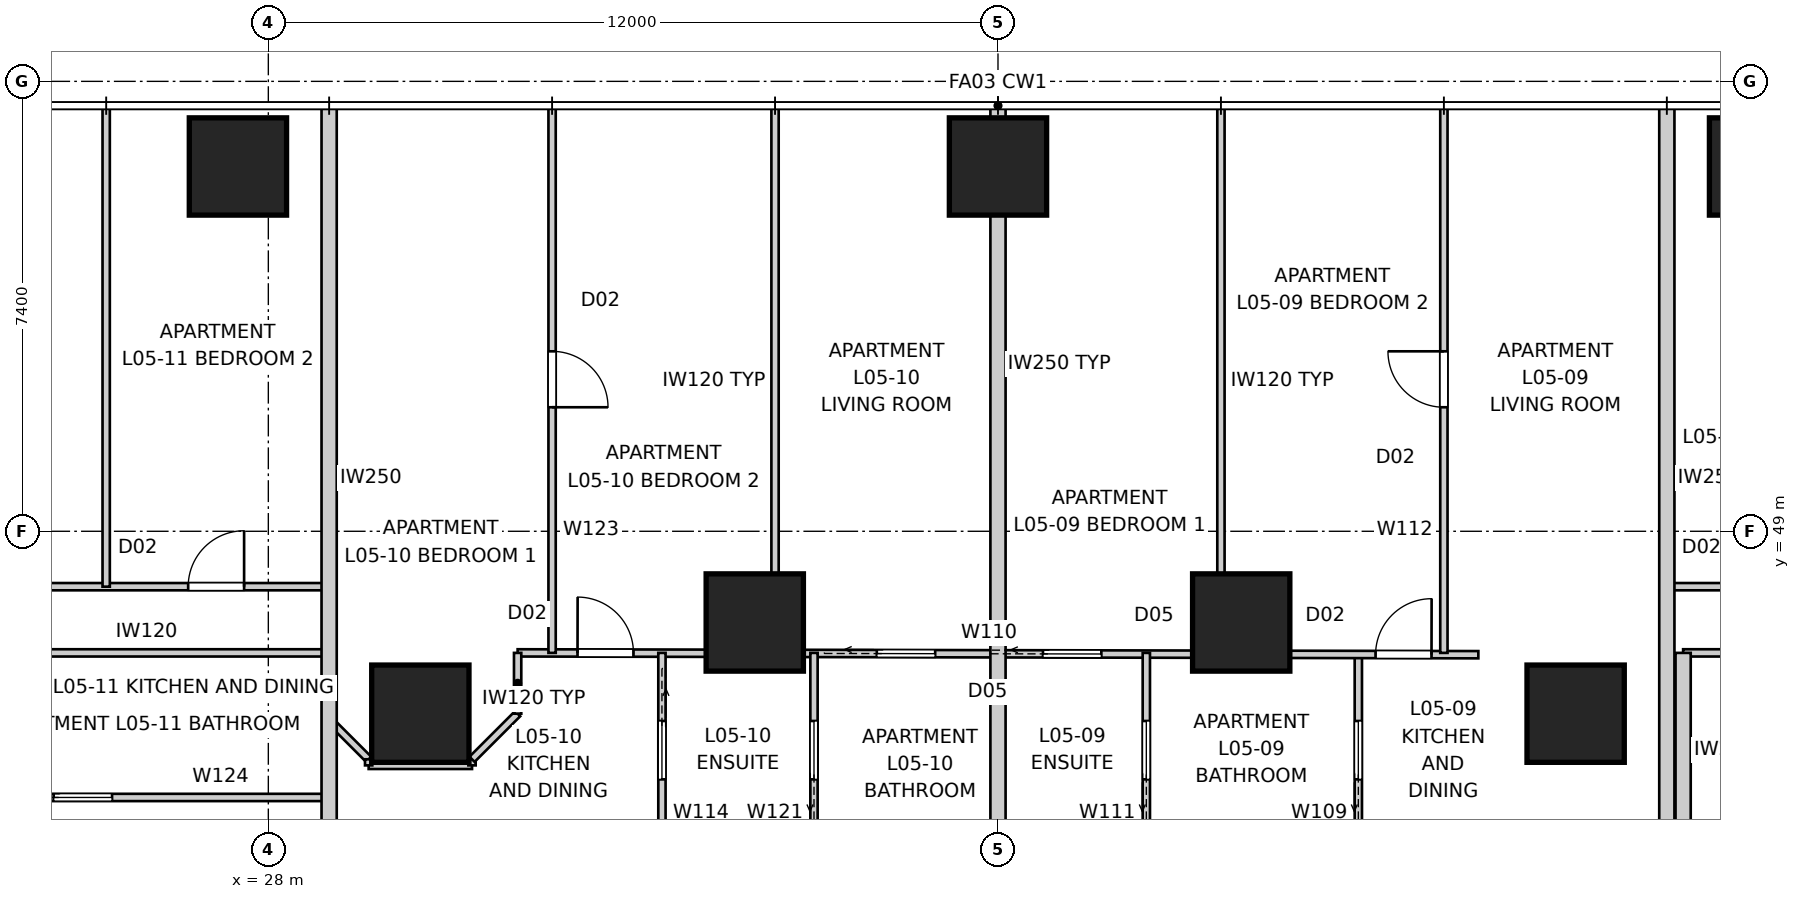
"""IFC4 building model, lengths in metres.
Left out: names, types, materials, properties, quantities, classifications, styles, units other than length and angle.
Written with IfcOpenShell. Run it as: python <this file> out.ifc"""

import sys

from ifc_helpers import new_model, si_unit, direction, frame, frame_2d, origin, origin_2d, place, context, subcontext, project, spatial, rectangle, extrude, element, fill, save


model = new_model("IFC4")
c1 = context("Model", 3, precision=1e-05, world=origin(), true_north=direction((0.0, 1.0)))
c2 = subcontext(c1, "Body", "Model", "MODEL_VIEW")
j1 = project(units=[si_unit("LENGTHUNIT", "METRE"), si_unit("PLANEANGLEUNIT", "RADIAN")], contexts=[c1])
p1 = place(None, origin())
s1 = spatial("IfcSite", under=j1, at=p1, CompositionType="ELEMENT")
p2 = place(p1, origin())
s2 = spatial("IfcBuilding", under=s1, at=p2, CompositionType="ELEMENT")
p3 = place(p2, frame((0.0, 0.0, 21.8)))
s3 = spatial("IfcBuildingStorey", under=s2, at=p3, CompositionType="ELEMENT", Elevation=21.8)
for number, where, z_axis, x_axis in (
    (1, (52.5, 55.0, 0.0), (0.0, 0.0, 1.0), (1.0, 0.0, 0.0)),
    (2, (40.0, 55.0, 0.0), (0.0, 0.0, 1.0), (1.0, 0.0, 0.0)),
    (3, (27.5, 55.0, 0.0), (0.0, 0.0, 1.0), (1.0, 0.0, 0.0)),
    (4, (49.5, 46.0, 0.0), (0.0, 0.0, 1.0), (1.0, 0.0, 0.0)),
    (5, (44.0, 47.5, 0.0), (0.0, 0.0, 1.0), (1.0, 0.0, 0.0)),
    (6, (36.0, 47.5, 0.0), (0.0, 0.0, 1.0), (1.0, 0.0, 0.0)),
    (7, (30.5, 46.0, 0.0), (0.0, 0.0, 1.0), (1.0, 0.0, 0.0)),
):
    element("IfcColumn", number, at=place(p3, frame(where, z_axis=z_axis, x_axis=x_axis)), inside=s3, PredefinedType="COLUMN", context=c2, shape_type="SweptSolid", body=[
        extrude(rectangle(XDim=1.6, YDim=1.6, at=origin_2d()), origin(), (0.0, 0.0, 1.0), 3.4),
    ])
for number, where, z_axis, x_axis in (
    (8, (51.0, 56.0, 0.0), (0.0, 0.0, 1.0), (0.0, -1.0, 0.0)),
    (9, (29.0, 56.0, 0.0), (0.0, 0.0, 1.0), (0.0, -1.0, 0.0)),
):
    element("IfcWall", number, at=place(p3, frame(where, z_axis=z_axis, x_axis=x_axis)), inside=s3, PredefinedType="PARTITIONING", context=c2, shape_type="SweptSolid", body=[
        extrude(rectangle(XDim=12.24, YDim=0.25, at=frame_2d((6.12, 0.0))), origin(), (0.0, 0.0, 1.0), 3.25),
    ])
p4 = place(p3, frame((40.0, 56.0, 0.0), z_axis=(0.0, 0.0, 1.0), x_axis=(0.0, -1.0, 0.0)))
e10 = element("IfcWall", 10, at=p4, inside=s3, PredefinedType="PARTITIONING", context=c2, shape_type="SweptSolid", body=[
    extrude(rectangle(XDim=8.5, YDim=0.25, at=frame_2d((4.25, 0.0))), origin(), (0.0, 0.0, 1.0), 3.25),
])
p5 = place(p3, frame((40.0, 47.5, 0.0), z_axis=(0.0, 0.0, 1.0), x_axis=(0.0, -1.0, 0.0)))
e11 = element("IfcWall", 11, at=p5, inside=s3, PredefinedType="PARTITIONING", context=c2, shape_type="SweptSolid", body=[
    extrude(rectangle(XDim=3.74, YDim=0.25, at=frame_2d((1.87, 0.0))), origin(), (0.0, 0.0, 1.0), 2.796),
])
p6 = place(p3, frame((51.268, 47.0, 0.0), z_axis=(0.0, 0.0, 1.0), x_axis=(1.0, 0.0, 0.0)))
e12 = element("IfcWall", 12, at=p6, inside=s3, PredefinedType="PARTITIONING", context=c2, shape_type="SweptSolid", body=[
    extrude(rectangle(XDim=5.732, YDim=0.12, at=frame_2d((2.866, 0.0))), origin(), (0.0, 0.0, 1.0), 3.25),
])
p7 = place(p6, frame((2.406, 0.0, 0.0)))
e13 = element("IfcOpeningElement", 13, at=p7, cuts=e12, PredefinedType="OPENING", context=c2, shape_type="SweptSolid", body=[
    extrude(rectangle(XDim=0.92, YDim=2.34, at=frame_2d((0.46, 1.17))), frame((0.0, 0.07, 0.0), z_axis=(0.0, -1.0, 0.0), x_axis=(1.0, 0.0, 0.0)), (0.0, 0.0, 1.0), 0.14),
])
p8 = place(p3, frame((51.268, 43.8, 0.0), z_axis=(0.0, 0.0, 1.0), x_axis=(0.0, 1.0, 0.0)))
e14 = element("IfcWall", 14, at=p8, inside=s3, PredefinedType="PARTITIONING", context=c2, shape_type="SweptSolid", body=[
    extrude(rectangle(XDim=3.2, YDim=0.25, at=frame_2d((1.6, 0.0))), origin(), (0.0, 0.0, 1.0), 3.25),
])
p9 = place(p3, frame((51.0, 48.089, 0.0), z_axis=(0.0, 0.0, 1.0), x_axis=(1.0, 0.0, 0.0)))
e15 = element("IfcWall", 15, at=p9, inside=s3, PredefinedType="PARTITIONING", context=c2, shape_type="SweptSolid", body=[
    extrude(rectangle(XDim=14.96, YDim=0.12, at=frame_2d((7.48, 0.0))), origin(), (0.0, 0.0, 1.0), 3.25),
])
p10 = place(p9, frame((6.298, 0.0, 0.0)))
e16 = element("IfcOpeningElement", 16, at=p10, cuts=e15, PredefinedType="OPENING", context=c2, shape_type="SweptSolid", body=[
    extrude(rectangle(XDim=0.92, YDim=2.34, at=frame_2d((0.46, 1.17))), frame((0.0, 0.07, 0.0), z_axis=(0.0, -1.0, 0.0), x_axis=(1.0, 0.0, 0.0)), (0.0, 0.0, 1.0), 0.14),
])
p11 = place(p9, frame((1.398, 0.0, 0.0)))
e17 = element("IfcOpeningElement", 17, at=p11, cuts=e15, PredefinedType="OPENING", context=c2, shape_type="SweptSolid", body=[
    extrude(rectangle(XDim=0.92, YDim=2.34, at=frame_2d((0.46, 1.17))), frame((0.0, 0.07, 0.0), z_axis=(0.0, -1.0, 0.0), x_axis=(1.0, 0.0, 0.0)), (0.0, 0.0, 1.0), 0.14),
])
p12 = place(p3, frame((45.926, 43.83, 0.0), z_axis=(0.0, 0.0, 1.0), x_axis=(0.0, 1.0, 0.0)))
e18 = element("IfcWall", 18, at=p12, inside=s3, PredefinedType="PARTITIONING", context=c2, shape_type="SweptSolid", body=[
    extrude(rectangle(XDim=3.14, YDim=0.12, at=frame_2d((1.57, 0.0))), origin(), (0.0, 0.0, 1.0), 3.25),
])
p13 = place(p12, frame((1.09, 0.0, 0.0)))
e19 = element("IfcOpeningElement", 19, at=p13, cuts=e18, PredefinedType="OPENING", context=c2, shape_type="SweptSolid", body=[
    extrude(rectangle(XDim=0.96, YDim=2.1, at=frame_2d((0.48, 1.05))), frame((0.0, 0.07, 0.0), z_axis=(0.0, -1.0, 0.0), x_axis=(1.0, 0.0, 0.0)), (0.0, 0.0, 1.0), 0.14),
])
p14 = place(p3, frame((32.1, 47.0, 0.0), z_axis=(0.0, 0.0, 1.0), x_axis=(0.999998193842, -0.001900608472, 0.0)))
e20 = element("IfcWall", 20, at=p14, inside=s3, PredefinedType="PARTITIONING", context=c2, shape_type="SweptSolid", body=[
    extrude(rectangle(XDim=15.8, YDim=0.12, at=frame_2d((7.9, 0.0))), origin(), (0.0, 0.0, 1.0), 2.549),
])
p15 = place(p14, frame((0.985, 0.0, 0.0)))
e21 = element("IfcOpeningElement", 21, at=p15, cuts=e20, PredefinedType="OPENING", context=c2, shape_type="SweptSolid", body=[
    extrude(rectangle(XDim=0.92, YDim=2.34, at=frame_2d((0.46, 1.17))), frame((0.0, 0.07, 0.0), z_axis=(0.0, -1.0, 0.0), x_axis=(1.0, 0.0, 0.0)), (0.0, 0.0, 1.0), 0.14),
])
p16 = place(p14, frame((14.11, 0.0, 0.0)))
e22 = element("IfcOpeningElement", 22, at=p16, cuts=e20, PredefinedType="OPENING", context=c2, shape_type="SweptSolid", body=[
    extrude(rectangle(XDim=0.92, YDim=2.34, at=frame_2d((0.46, 1.17))), frame((0.0, 0.07, 0.0), z_axis=(0.0, -1.0, 0.0), x_axis=(1.0, 0.0, 0.0)), (0.0, 0.0, 1.0), 0.14),
])
p17 = place(p14, frame((5.907, 0.0, 0.0)))
e23 = element("IfcOpeningElement", 23, at=p17, cuts=e20, PredefinedType="OPENING", context=c2, shape_type="SweptSolid", body=[
    extrude(rectangle(XDim=0.96, YDim=2.1, at=frame_2d((0.48, 1.05))), frame((0.0, 0.07, 0.0), z_axis=(0.0, -1.0, 0.0), x_axis=(1.0, 0.0, 0.0)), (0.0, 0.0, 1.0), 0.14),
])
p18 = place(p14, frame((8.64, 0.0, 0.0)))
e24 = element("IfcOpeningElement", 24, at=p18, cuts=e20, PredefinedType="OPENING", context=c2, shape_type="SweptSolid", body=[
    extrude(rectangle(XDim=0.96, YDim=2.1, at=frame_2d((0.48, 1.05))), frame((0.0, 0.07, 0.0), z_axis=(0.0, -1.0, 0.0), x_axis=(1.0, 0.0, 0.0)), (0.0, 0.0, 1.0), 0.14),
])
p19 = place(p3, frame((42.44, 43.8, 0.0), z_axis=(0.0, 0.0, 1.0), x_axis=(0.0, 1.0, 0.0)))
e25 = element("IfcWall", 25, at=p19, inside=s3, PredefinedType="PARTITIONING", context=c2, shape_type="SweptSolid", body=[
    extrude(rectangle(XDim=3.2, YDim=0.12, at=frame_2d((1.6, 0.0))), origin(), (0.0, 0.0, 1.0), 3.25),
])
p20 = place(p19, frame((1.12, 0.0, 0.0)))
e26 = element("IfcOpeningElement", 26, at=p20, cuts=e25, PredefinedType="OPENING", context=c2, shape_type="SweptSolid", body=[
    extrude(rectangle(XDim=0.96, YDim=2.1, at=frame_2d((0.48, 1.05))), frame((0.0, 0.07, 0.0), z_axis=(0.0, -1.0, 0.0), x_axis=(1.0, 0.0, 0.0)), (0.0, 0.0, 1.0), 0.14),
])
p21 = place(p3, frame((47.333, 47.0, 0.0), z_axis=(0.0, 0.0, 1.0), x_axis=(0.0, 1.0, 0.0)))
e27 = element("IfcWall", 27, at=p21, inside=s3, PredefinedType="PARTITIONING", context=c2, shape_type="SweptSolid", body=[
    extrude(rectangle(XDim=8.96, YDim=0.12, at=frame_2d((4.48, 0.0))), origin(), (0.0, 0.0, 1.0), 3.25),
])
p22 = place(p21, frame((4.04, 0.0, 0.0)))
e28 = element("IfcOpeningElement", 28, at=p22, cuts=e27, PredefinedType="OPENING", context=c2, shape_type="SweptSolid", body=[
    extrude(rectangle(XDim=0.92, YDim=2.34, at=frame_2d((0.46, 1.17))), frame((0.0, 0.07, 0.0), z_axis=(0.0, -1.0, 0.0), x_axis=(1.0, 0.0, 0.0)), (0.0, 0.0, 1.0), 0.14),
])
p23 = place(p3, frame((43.667, 55.96, 0.0), z_axis=(0.0, 0.0, 1.0), x_axis=(0.0, -1.0, 0.0)))
e29 = element("IfcWall", 29, at=p23, inside=s3, PredefinedType="PARTITIONING", context=c2, shape_type="SweptSolid", body=[
    extrude(rectangle(XDim=8.96, YDim=0.12, at=frame_2d((4.48, 0.0))), origin(), (0.0, 0.0, 1.0), 3.25),
])
p24 = place(p3, frame((34.473, 47.0, 0.0), z_axis=(0.0, 0.0, 1.0), x_axis=(0.0, -1.0, 0.0)))
e30 = element("IfcWall", 30, at=p24, inside=s3, PredefinedType="PARTITIONING", context=c2, shape_type="SweptSolid", body=[
    extrude(rectangle(XDim=3.2, YDim=0.12, at=frame_2d((1.6, 0.0))), origin(), (0.0, 0.0, 1.0), 3.25),
])
p25 = place(p24, frame((1.12, 0.0, 0.0)))
e31 = element("IfcOpeningElement", 31, at=p25, cuts=e30, PredefinedType="OPENING", context=c2, shape_type="SweptSolid", body=[
    extrude(rectangle(XDim=0.96, YDim=2.1, at=frame_2d((0.48, 1.05))), frame((0.0, 0.07, 0.0), z_axis=(0.0, -1.0, 0.0), x_axis=(1.0, 0.0, 0.0)), (0.0, 0.0, 1.0), 0.14),
])
p26 = place(p3, frame((29.0, 45.9, 0.0), z_axis=(0.0, 0.0, 1.0), x_axis=(0.707106781187, -0.707106781187, 0.0)))
e32 = element("IfcWall", 32, at=p26, inside=s3, PredefinedType="PARTITIONING", context=c2, shape_type="SweptSolid", body=[
    extrude(rectangle(XDim=0.919, YDim=0.12, at=frame_2d((0.459, 0.0))), origin(), (0.0, 0.0, 1.0), 3.25),
])
p27 = place(p3, frame((29.65, 45.15, 0.0), z_axis=(0.0, 0.0, 1.0), x_axis=(1.0, 0.0, 0.0)))
e33 = element("IfcWall", 33, at=p27, inside=s3, PredefinedType="PARTITIONING", context=c2, shape_type="SweptSolid", body=[
    extrude(rectangle(XDim=1.7, YDim=0.12, at=frame_2d((0.85, 0.0))), origin(), (0.0, 0.0, 1.0), 3.25),
])
p28 = place(p3, frame((31.35, 45.25, 0.0), z_axis=(0.0, 0.0, 1.0), x_axis=(0.707106781187, 0.707106781187, 0.0)))
e34 = element("IfcWall", 34, at=p28, inside=s3, PredefinedType="PARTITIONING", context=c2, shape_type="SweptSolid", body=[
    extrude(rectangle(XDim=1.061, YDim=0.12, at=frame_2d((0.53, 0.0))), origin(), (0.0, 0.0, 1.0), 3.25),
])
p29 = place(p3, frame((32.1, 46.0, 0.0), z_axis=(0.0, 0.0, 1.0), x_axis=(0.0, 1.0, 0.0)))
e35 = element("IfcWall", 35, at=p29, inside=s3, PredefinedType="PARTITIONING", context=c2, shape_type="SweptSolid", body=[
    extrude(rectangle(XDim=1.0, YDim=0.12, at=frame_2d((0.5, 0.0))), origin(), (0.0, 0.0, 1.0), 3.25),
])
p30 = place(p3, frame((36.974, 43.8, 0.0), z_axis=(0.0, 0.0, 1.0), x_axis=(0.0, 1.0, 0.0)))
e36 = element("IfcWall", 36, at=p30, inside=s3, PredefinedType="PARTITIONING", context=c2, shape_type="SweptSolid", body=[
    extrude(rectangle(XDim=3.2, YDim=0.12, at=frame_2d((1.6, 0.0))), origin(), (0.0, 0.0, 1.0), 3.25),
])
p31 = place(p30, frame((1.12, 0.0, 0.0)))
e37 = element("IfcOpeningElement", 37, at=p31, cuts=e36, PredefinedType="OPENING", context=c2, shape_type="SweptSolid", body=[
    extrude(rectangle(XDim=0.96, YDim=2.1, at=frame_2d((0.48, 1.05))), frame((0.0, 0.07, 0.0), z_axis=(0.0, -1.0, 0.0), x_axis=(1.0, 0.0, 0.0)), (0.0, 0.0, 1.0), 0.14),
])
p32 = place(p3, frame((36.333, 47.0, 0.0), z_axis=(0.0, 0.0, 1.0), x_axis=(0.0, 1.0, 0.0)))
e38 = element("IfcWall", 38, at=p32, inside=s3, PredefinedType="PARTITIONING", context=c2, shape_type="SweptSolid", body=[
    extrude(rectangle(XDim=8.96, YDim=0.12, at=frame_2d((4.48, 0.0))), origin(), (0.0, 0.0, 1.0), 3.25),
])
p33 = place(p3, frame((32.667, 55.96, 0.0), z_axis=(0.0, 0.0, 1.0), x_axis=(0.0, -1.0, 0.0)))
e39 = element("IfcWall", 39, at=p33, inside=s3, PredefinedType="PARTITIONING", context=c2, shape_type="SweptSolid", body=[
    extrude(rectangle(XDim=8.96, YDim=0.12, at=frame_2d((4.48, 0.0))), origin(), (0.0, 0.0, 1.0), 3.25),
])
p34 = place(p33, frame((4.0, 0.0, 0.0)))
e40 = element("IfcOpeningElement", 40, at=p34, cuts=e39, PredefinedType="OPENING", context=c2, shape_type="SweptSolid", body=[
    extrude(rectangle(XDim=0.92, YDim=2.34, at=frame_2d((0.46, 1.17))), frame((0.0, 0.07, 0.0), z_axis=(0.0, -1.0, 0.0), x_axis=(1.0, 0.0, 0.0)), (0.0, 0.0, 1.0), 0.14),
])
p35 = place(p3, frame((23.0, 44.622, 0.0), z_axis=(0.0, 0.0, 1.0), x_axis=(1.0, 0.0, 0.0)))
e41 = element("IfcWall", 41, at=p35, inside=s3, PredefinedType="PARTITIONING", context=c2, shape_type="SweptSolid", body=[
    extrude(rectangle(XDim=6.0, YDim=0.12, at=frame_2d((3.0, 0.0))), origin(), (0.0, 0.0, 1.0), 2.638),
])
p36 = place(p35, frame((1.47, 0.0, 0.0)))
e42 = element("IfcOpeningElement", 42, at=p36, cuts=e41, PredefinedType="OPENING", context=c2, shape_type="SweptSolid", body=[
    extrude(rectangle(XDim=0.96, YDim=2.1, at=frame_2d((0.48, 1.05))), frame((0.0, 0.07, 0.0), z_axis=(0.0, -1.0, 0.0), x_axis=(1.0, 0.0, 0.0)), (0.0, 0.0, 1.0), 0.14),
])
p37 = place(p3, frame((23.0, 47.0, 0.0), z_axis=(0.0, 0.0, 1.0), x_axis=(1.0, 0.0, 0.0)))
e43 = element("IfcWall", 43, at=p37, inside=s3, PredefinedType="PARTITIONING", context=c2, shape_type="SweptSolid", body=[
    extrude(rectangle(XDim=6.0, YDim=0.12, at=frame_2d((3.0, 0.0))), origin(), (0.0, 0.0, 1.0), 3.25),
])
p38 = place(p3, frame((14.04, 48.089, 0.0), z_axis=(0.0, 0.0, 1.0), x_axis=(1.0, 0.0, 0.0)))
e44 = element("IfcWall", 44, at=p38, inside=s3, PredefinedType="PARTITIONING", context=c2, shape_type="SweptSolid", body=[
    extrude(rectangle(XDim=14.96, YDim=0.12, at=frame_2d((7.48, 0.0))), origin(), (0.0, 0.0, 1.0), 3.25),
])
p39 = place(p38, frame((7.742, 0.0, 0.0)))
e45 = element("IfcOpeningElement", 45, at=p39, cuts=e44, PredefinedType="OPENING", context=c2, shape_type="SweptSolid", body=[
    extrude(rectangle(XDim=0.92, YDim=2.34, at=frame_2d((0.46, 1.17))), frame((0.0, 0.07, 0.0), z_axis=(0.0, -1.0, 0.0), x_axis=(1.0, 0.0, 0.0)), (0.0, 0.0, 1.0), 0.14),
])
p40 = place(p38, frame((12.642, 0.0, 0.0)))
e46 = element("IfcOpeningElement", 46, at=p40, cuts=e44, PredefinedType="OPENING", context=c2, shape_type="SweptSolid", body=[
    extrude(rectangle(XDim=0.92, YDim=2.34, at=frame_2d((0.46, 1.17))), frame((0.0, 0.07, 0.0), z_axis=(0.0, -1.0, 0.0), x_axis=(1.0, 0.0, 0.0)), (0.0, 0.0, 1.0), 0.14),
])
p41 = place(p3, frame((25.333, 55.96, 0.0), z_axis=(0.0, 0.0, 1.0), x_axis=(0.0, -1.0, 0.0)))
e47 = element("IfcWall", 47, at=p41, inside=s3, PredefinedType="PARTITIONING", context=c2, shape_type="SweptSolid", body=[
    extrude(rectangle(XDim=7.871, YDim=0.12, at=frame_2d((3.936, 0.0))), origin(), (0.0, 0.0, 1.0), 2.638),
])
for number, where, z_axis, x_axis in (
    (48, (29.65, 45.15, 0.0), (0.0, 0.0, 1.0), (0.0, 1.0, 0.0)),
    (49, (31.35, 45.15, 0.0), (0.0, 0.0, 1.0), (0.0, 1.0, 0.0)),
):
    element("IfcWall", number, at=place(p3, frame(where, z_axis=z_axis, x_axis=x_axis)), inside=s3, PredefinedType="PARTITIONING", context=c2, shape_type="SweptSolid", body=[
        extrude(rectangle(XDim=0.1, YDim=0.12, at=frame_2d((0.05, 0.0))), origin(), (0.0, 0.0, 1.0), 3.25),
    ])
p42 = place(p25, origin())
e50 = element("IfcDoor", 50, at=p42, inside=s3, OperationType="SLIDING_TO_LEFT", PredefinedType="DOOR", context=c2, shape_type="SweptSolid", body=[
    extrude(rectangle(XDim=0.96, YDim=2.1, at=frame_2d((0.48, 1.05))), frame((0.0, 0.025, 0.0), z_axis=(0.0, -1.0, 0.0), x_axis=(1.0, 0.0, 0.0)), (0.0, 0.0, 1.0), 0.05),
])
fill(e31, e50)
p43 = place(p15, origin())
e51 = element("IfcDoor", 51, at=p43, inside=s3, OperationType="SINGLE_SWING_LEFT", PredefinedType="DOOR", context=c2, shape_type="SweptSolid", body=[
    extrude(rectangle(XDim=0.92, YDim=2.34, at=frame_2d((0.46, 1.17))), frame((0.0, 0.025, 0.0), z_axis=(0.0, -1.0, 0.0), x_axis=(1.0, 0.0, 0.0)), (0.0, 0.0, 1.0), 0.05),
])
fill(e21, e51)
p44 = place(p13, origin())
e52 = element("IfcDoor", 52, at=p44, inside=s3, OperationType="SLIDING_TO_LEFT", PredefinedType="DOOR", context=c2, shape_type="SweptSolid", body=[
    extrude(rectangle(XDim=0.96, YDim=2.1, at=frame_2d((0.48, 1.05))), frame((0.0, 0.025, 0.0), z_axis=(0.0, -1.0, 0.0), x_axis=(1.0, 0.0, 0.0)), (0.0, 0.0, 1.0), 0.05),
])
fill(e19, e52)
p45 = place(p16, origin())
e53 = element("IfcDoor", 53, at=p45, inside=s3, OperationType="SINGLE_SWING_RIGHT", PredefinedType="DOOR", context=c2, shape_type="SweptSolid", body=[
    extrude(rectangle(XDim=0.92, YDim=2.34, at=frame_2d((0.46, 1.17))), frame((0.0, 0.025, 0.0), z_axis=(0.0, -1.0, 0.0), x_axis=(1.0, 0.0, 0.0)), (0.0, 0.0, 1.0), 0.05),
])
fill(e22, e53)
p46 = place(p36, origin())
e54 = element("IfcDoor", 54, at=p46, inside=s3, OperationType="SLIDING_TO_LEFT", PredefinedType="DOOR", context=c2, shape_type="SweptSolid", body=[
    extrude(rectangle(XDim=0.96, YDim=2.1, at=frame_2d((0.48, 1.05))), frame((0.0, 0.025, 0.0), z_axis=(0.0, -1.0, 0.0), x_axis=(1.0, 0.0, 0.0)), (0.0, 0.0, 1.0), 0.05),
])
fill(e42, e54)
p47 = place(p31, origin())
e55 = element("IfcDoor", 55, at=p47, inside=s3, OperationType="SLIDING_TO_LEFT", PredefinedType="DOOR", context=c2, shape_type="SweptSolid", body=[
    extrude(rectangle(XDim=0.96, YDim=2.1, at=frame_2d((0.48, 1.05))), frame((0.0, 0.025, 0.0), z_axis=(0.0, -1.0, 0.0), x_axis=(1.0, 0.0, 0.0)), (0.0, 0.0, 1.0), 0.05),
])
fill(e37, e55)
p48 = place(p20, origin())
e56 = element("IfcDoor", 56, at=p48, inside=s3, OperationType="SLIDING_TO_LEFT", PredefinedType="DOOR", context=c2, shape_type="SweptSolid", body=[
    extrude(rectangle(XDim=0.96, YDim=2.1, at=frame_2d((0.48, 1.05))), frame((0.0, 0.025, 0.0), z_axis=(0.0, -1.0, 0.0), x_axis=(1.0, 0.0, 0.0)), (0.0, 0.0, 1.0), 0.05),
])
fill(e26, e56)
p49 = place(p40, origin())
e57 = element("IfcDoor", 57, at=p49, inside=s3, OperationType="SINGLE_SWING_RIGHT", PredefinedType="DOOR", context=c2, shape_type="SweptSolid", body=[
    extrude(rectangle(XDim=0.92, YDim=2.34, at=frame_2d((0.46, 1.17))), frame((0.0, 0.025, 0.0), z_axis=(0.0, -1.0, 0.0), x_axis=(1.0, 0.0, 0.0)), (0.0, 0.0, 1.0), 0.05),
])
fill(e46, e57)
p50 = place(p17, origin())
e58 = element("IfcDoor", 58, at=p50, inside=s3, OperationType="SLIDING_TO_LEFT", PredefinedType="DOOR", context=c2, shape_type="SweptSolid", body=[
    extrude(rectangle(XDim=0.96, YDim=2.1, at=frame_2d((0.48, 1.05))), frame((0.0, 0.025, 0.0), z_axis=(0.0, -1.0, 0.0), x_axis=(1.0, 0.0, 0.0)), (0.0, 0.0, 1.0), 0.05),
])
fill(e23, e58)
p51 = place(p18, origin())
e59 = element("IfcDoor", 59, at=p51, inside=s3, OperationType="SLIDING_TO_LEFT", PredefinedType="DOOR", context=c2, shape_type="SweptSolid", body=[
    extrude(rectangle(XDim=0.96, YDim=2.1, at=frame_2d((0.48, 1.05))), frame((0.0, 0.025, 0.0), z_axis=(0.0, -1.0, 0.0), x_axis=(1.0, 0.0, 0.0)), (0.0, 0.0, 1.0), 0.05),
])
fill(e24, e59)
p52 = place(p34, origin())
e60 = element("IfcDoor", 60, at=p52, inside=s3, OperationType="SINGLE_SWING_RIGHT", PredefinedType="DOOR", context=c2, shape_type="SweptSolid", body=[
    extrude(rectangle(XDim=0.92, YDim=2.34, at=frame_2d((0.46, 1.17))), frame((0.0, 0.025, 0.0), z_axis=(0.0, -1.0, 0.0), x_axis=(1.0, 0.0, 0.0)), (0.0, 0.0, 1.0), 0.05),
])
fill(e40, e60)
p53 = place(p22, origin())
e61 = element("IfcDoor", 61, at=p53, inside=s3, OperationType="SINGLE_SWING_RIGHT", PredefinedType="DOOR", context=c2, shape_type="SweptSolid", body=[
    extrude(rectangle(XDim=0.92, YDim=2.34, at=frame_2d((0.46, 1.17))), frame((0.0, 0.025, 0.0), z_axis=(0.0, -1.0, 0.0), x_axis=(1.0, 0.0, 0.0)), (0.0, 0.0, 1.0), 0.05),
])
fill(e28, e61)
save(model, sys.argv[1])
